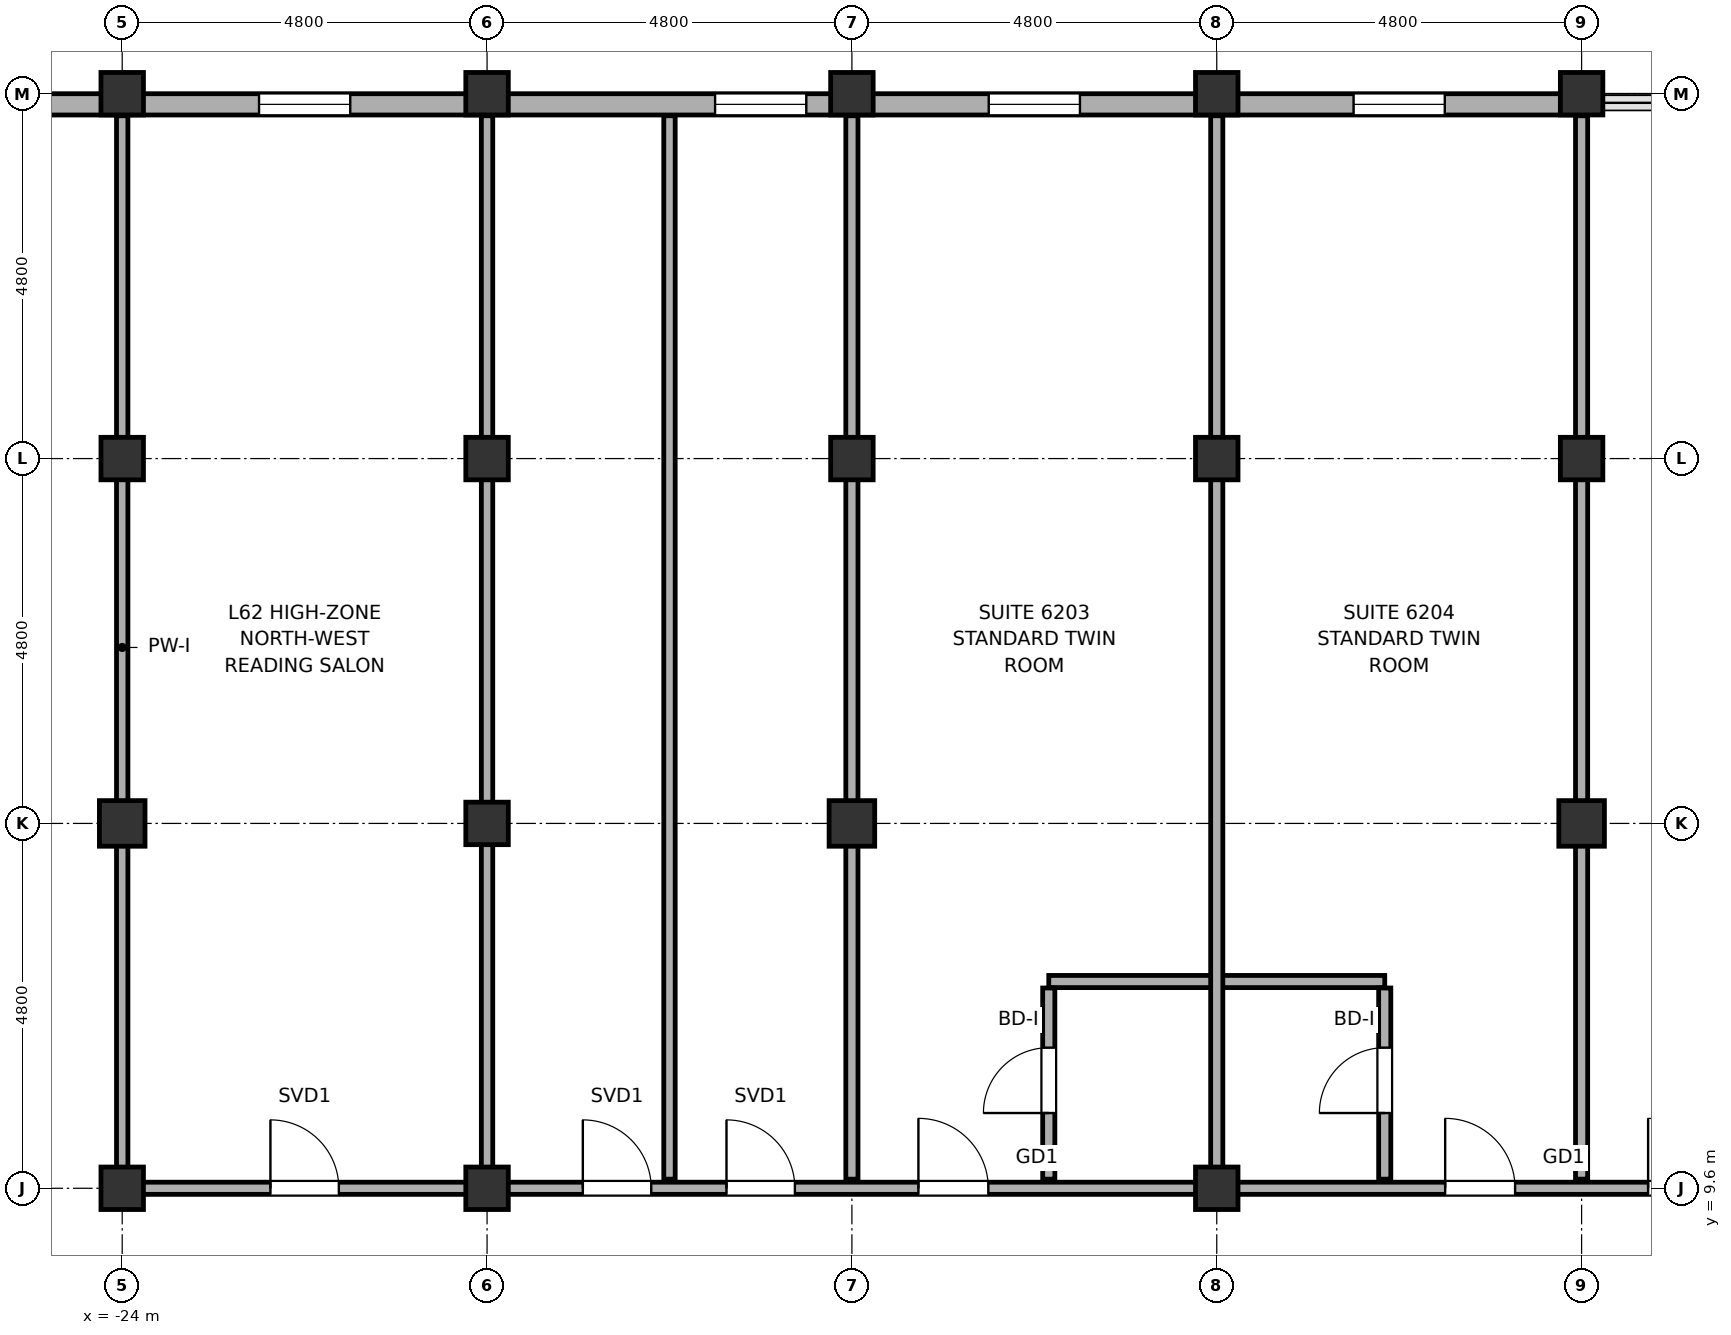
"""IFC4 building model, lengths in metres.
Left out: names, types, materials, properties, quantities, classifications, styles, units other than length and angle.
Written with IfcOpenShell. Run it as: python <this file> out.ifc"""

import sys

from ifc_helpers import new_model, si_unit, direction, frame, frame_2d, origin, origin_2d, place, context, subcontext, project, spatial, rectangle, hollow_rectangle, hollow_circle, extrude, element, fill, save


model = new_model("IFC4")
c1 = context("Model", 3, precision=1e-05, world=origin(), true_north=direction((0.0, 1.0)))
c2 = subcontext(c1, "Body", "Model", "MODEL_VIEW")
j1 = project(units=[si_unit("LENGTHUNIT", "METRE"), si_unit("PLANEANGLEUNIT", "RADIAN")], contexts=[c1])
p1 = place(None, origin())
s1 = spatial("IfcSite", under=j1, at=p1, CompositionType="ELEMENT")
p2 = place(p1, origin())
s2 = spatial("IfcBuilding", under=s1, at=p2, CompositionType="ELEMENT")
p3 = place(p2, frame((0.0, 0.0, 249.25)))
s3 = spatial("IfcBuildingStorey", under=s2, at=p3, CompositionType="ELEMENT", Elevation=249.25)
p4 = place(p3, frame((-24.0, 9.6, 0.0), z_axis=(0.0, 0.0, 1.0), x_axis=(1.0, 0.0, 0.0)))
e1 = element("IfcColumn", 1, at=p4, inside=s3, PredefinedType="COLUMN", context=c2, shape_type="SweptSolid", body=[
    extrude(hollow_circle(Radius=0.28, WallThickness=0.025, at=origin_2d()), origin(), (0.0, 0.0, 1.0), 3.85),
])
p5 = place(p3, frame((-24.0, 14.4, 0.0), z_axis=(0.0, 0.0, 1.0), x_axis=(1.0, 0.0, 0.0)))
e2 = element("IfcColumn", 2, at=p5, inside=s3, PredefinedType="COLUMN", context=c2, shape_type="SweptSolid", body=[
    extrude(hollow_rectangle(XDim=0.6, YDim=0.6, WallThickness=0.028, at=origin_2d()), origin(), (0.0, 0.0, 1.0), 3.85),
])
for number, where, z_axis, x_axis in (
    (3, (-24.0, 19.2, 0.0), (0.0, 0.0, 1.0), (1.0, 0.0, 0.0)),
    (4, (-24.0, 24.0, 0.0), (0.0, 0.0, 1.0), (1.0, 0.0, 0.0)),
    (5, (-19.2, 9.6, 0.0), (0.0, 0.0, 1.0), (1.0, 0.0, 0.0)),
    (6, (-19.2, 14.4, 0.0), (0.0, 0.0, 1.0), (1.0, 0.0, 0.0)),
    (7, (-19.2, 19.2, 0.0), (0.0, 0.0, 1.0), (1.0, 0.0, 0.0)),
    (8, (-19.2, 24.0, 0.0), (0.0, 0.0, 1.0), (1.0, 0.0, 0.0)),
):
    element("IfcColumn", number, at=place(p3, frame(where, z_axis=z_axis, x_axis=x_axis)), inside=s3, PredefinedType="COLUMN", context=c2, shape_type="SweptSolid", body=[
        extrude(hollow_circle(Radius=0.28, WallThickness=0.025, at=origin_2d()), origin(), (0.0, 0.0, 1.0), 3.85),
    ])
p6 = place(p3, frame((-14.4, 14.4, 0.0), z_axis=(0.0, 0.0, 1.0), x_axis=(1.0, 0.0, 0.0)))
e9 = element("IfcColumn", 9, at=p6, inside=s3, PredefinedType="COLUMN", context=c2, shape_type="SweptSolid", body=[
    extrude(hollow_rectangle(XDim=0.6, YDim=0.6, WallThickness=0.028, at=origin_2d()), origin(), (0.0, 0.0, 1.0), 3.85),
])
for number, where, z_axis, x_axis in (
    (10, (-14.4, 19.2, 0.0), (0.0, 0.0, 1.0), (1.0, 0.0, 0.0)),
    (11, (-14.4, 24.0, 0.0), (0.0, 0.0, 1.0), (1.0, 0.0, 0.0)),
    (12, (-9.6, 9.6, 0.0), (0.0, 0.0, 1.0), (1.0, 0.0, 0.0)),
    (13, (-9.6, 19.2, 0.0), (0.0, 0.0, 1.0), (1.0, 0.0, 0.0)),
    (14, (-9.6, 24.0, 0.0), (0.0, 0.0, 1.0), (1.0, 0.0, 0.0)),
):
    element("IfcColumn", number, at=place(p3, frame(where, z_axis=z_axis, x_axis=x_axis)), inside=s3, PredefinedType="COLUMN", context=c2, shape_type="SweptSolid", body=[
        extrude(hollow_circle(Radius=0.28, WallThickness=0.025, at=origin_2d()), origin(), (0.0, 0.0, 1.0), 3.85),
    ])
p7 = place(p3, frame((-4.8, 14.4, 0.0), z_axis=(0.0, 0.0, 1.0), x_axis=(1.0, 0.0, 0.0)))
e15 = element("IfcColumn", 15, at=p7, inside=s3, PredefinedType="COLUMN", context=c2, shape_type="SweptSolid", body=[
    extrude(hollow_rectangle(XDim=0.6, YDim=0.6, WallThickness=0.028, at=origin_2d()), origin(), (0.0, 0.0, 1.0), 3.85),
])
for number, where, z_axis, x_axis in (
    (16, (-4.8, 19.2, 0.0), (0.0, 0.0, 1.0), (1.0, 0.0, 0.0)),
    (17, (-4.8, 24.0, 0.0), (0.0, 0.0, 1.0), (1.0, 0.0, 0.0)),
):
    element("IfcColumn", number, at=place(p3, frame(where, z_axis=z_axis, x_axis=x_axis)), inside=s3, PredefinedType="COLUMN", context=c2, shape_type="SweptSolid", body=[
        extrude(hollow_circle(Radius=0.28, WallThickness=0.025, at=origin_2d()), origin(), (0.0, 0.0, 1.0), 3.85),
    ])
p8 = place(p3, frame((-30.0, 23.86, 0.0), z_axis=(0.0, 0.0, 1.0), x_axis=(1.0, 0.0, 0.0)))
e18 = element("IfcWall", 18, at=p8, inside=s3, PredefinedType="SOLIDWALL", context=c2, shape_type="SweptSolid", body=[
    extrude(rectangle(XDim=25.25, YDim=0.28, at=frame_2d((12.625, 0.0))), origin(), (0.0, 0.0, 1.0), 2.27),
])
p9 = place(p8, frame((7.8, 0.0, 0.75)))
e19 = element("IfcOpeningElement", 19, at=p9, cuts=e18, PredefinedType="OPENING", context=c2, shape_type="SweptSolid", body=[
    extrude(rectangle(XDim=1.2, YDim=1.15, at=frame_2d((0.6, 0.575))), frame((0.0, 0.155, 0.0), z_axis=(0.0, -1.0, 0.0), x_axis=(1.0, 0.0, 0.0)), (0.0, 0.0, 1.0), 0.31),
])
p10 = place(p8, frame((13.8, 0.0, 0.75)))
e20 = element("IfcOpeningElement", 20, at=p10, cuts=e18, PredefinedType="OPENING", context=c2, shape_type="SweptSolid", body=[
    extrude(rectangle(XDim=1.2, YDim=1.15, at=frame_2d((0.6, 0.575))), frame((0.0, 0.155, 0.0), z_axis=(0.0, -1.0, 0.0), x_axis=(1.0, 0.0, 0.0)), (0.0, 0.0, 1.0), 0.31),
])
p11 = place(p8, frame((17.4, 0.0, 0.75)))
e21 = element("IfcOpeningElement", 21, at=p11, cuts=e18, PredefinedType="OPENING", context=c2, shape_type="SweptSolid", body=[
    extrude(rectangle(XDim=1.2, YDim=1.15, at=frame_2d((0.6, 0.575))), frame((0.0, 0.155, 0.0), z_axis=(0.0, -1.0, 0.0), x_axis=(1.0, 0.0, 0.0)), (0.0, 0.0, 1.0), 0.31),
])
p12 = place(p8, frame((22.2, 0.0, 0.75)))
e22 = element("IfcOpeningElement", 22, at=p12, cuts=e18, PredefinedType="OPENING", context=c2, shape_type="SweptSolid", body=[
    extrude(rectangle(XDim=1.2, YDim=1.15, at=frame_2d((0.6, 0.575))), frame((0.0, 0.155, 0.0), z_axis=(0.0, -1.0, 0.0), x_axis=(1.0, 0.0, 0.0)), (0.0, 0.0, 1.0), 0.31),
])
p13 = place(p3, frame((-23.92, 9.6, 0.0), z_axis=(0.0, 0.0, 1.0), x_axis=(1.0, 0.0, 0.0)))
e23 = element("IfcWall", 23, at=p13, inside=s3, PredefinedType="PARTITIONING", context=c2, shape_type="SweptSolid", body=[
    extrude(rectangle(XDim=47.84, YDim=0.16, at=frame_2d((23.92, 0.0))), origin(), (0.0, 0.0, 1.0), 2.27),
])
p14 = place(p13, frame((1.87, 0.0, 0.0)))
e24 = element("IfcOpeningElement", 24, at=p14, cuts=e23, PredefinedType="OPENING", context=c2, shape_type="SweptSolid", body=[
    extrude(rectangle(XDim=0.9, YDim=2.1, at=frame_2d((0.45, 1.05))), frame((0.0, 0.095, 0.0), z_axis=(0.0, -1.0, 0.0), x_axis=(1.0, 0.0, 0.0)), (0.0, 0.0, 1.0), 0.19),
])
p15 = place(p13, frame((45.07, 0.0, 0.0)))
e25 = element("IfcOpeningElement", 25, at=p15, cuts=e23, PredefinedType="OPENING", context=c2, shape_type="SweptSolid", body=[
    extrude(rectangle(XDim=0.9, YDim=2.1, at=frame_2d((0.45, 1.05))), frame((0.0, 0.095, 0.0), z_axis=(0.0, -1.0, 0.0), x_axis=(1.0, 0.0, 0.0)), (0.0, 0.0, 1.0), 0.19),
])
p16 = place(p13, frame((5.98, 0.0, 0.0)))
e26 = element("IfcOpeningElement", 26, at=p16, cuts=e23, PredefinedType="OPENING", context=c2, shape_type="SweptSolid", body=[
    extrude(rectangle(XDim=0.9, YDim=2.1, at=frame_2d((0.45, 1.05))), frame((0.0, 0.095, 0.0), z_axis=(0.0, -1.0, 0.0), x_axis=(1.0, 0.0, 0.0)), (0.0, 0.0, 1.0), 0.19),
])
p17 = place(p13, frame((7.87, 0.0, 0.0)))
e27 = element("IfcOpeningElement", 27, at=p17, cuts=e23, PredefinedType="OPENING", context=c2, shape_type="SweptSolid", body=[
    extrude(rectangle(XDim=0.9, YDim=2.1, at=frame_2d((0.45, 1.05))), frame((0.0, 0.095, 0.0), z_axis=(0.0, -1.0, 0.0), x_axis=(1.0, 0.0, 0.0)), (0.0, 0.0, 1.0), 0.19),
])
p18 = place(p13, frame((10.395, 0.0, 0.0)))
e28 = element("IfcOpeningElement", 28, at=p18, cuts=e23, PredefinedType="OPENING", context=c2, shape_type="SweptSolid", body=[
    extrude(rectangle(XDim=0.92, YDim=2.15, at=frame_2d((0.46, 1.075))), frame((0.0, 0.095, 0.0), z_axis=(0.0, -1.0, 0.0), x_axis=(1.0, 0.0, 0.0)), (0.0, 0.0, 1.0), 0.19),
])
p19 = place(p13, frame((17.325, 0.0, 0.0)))
e29 = element("IfcOpeningElement", 29, at=p19, cuts=e23, PredefinedType="OPENING", context=c2, shape_type="SweptSolid", body=[
    extrude(rectangle(XDim=0.92, YDim=2.15, at=frame_2d((0.46, 1.075))), frame((0.0, 0.095, 0.0), z_axis=(0.0, -1.0, 0.0), x_axis=(1.0, 0.0, 0.0)), (0.0, 0.0, 1.0), 0.19),
])
p20 = place(p13, frame((19.995, 0.0, 0.0)))
e30 = element("IfcOpeningElement", 30, at=p20, cuts=e23, PredefinedType="OPENING", context=c2, shape_type="SweptSolid", body=[
    extrude(rectangle(XDim=0.92, YDim=2.15, at=frame_2d((0.46, 1.075))), frame((0.0, 0.095, 0.0), z_axis=(0.0, -1.0, 0.0), x_axis=(1.0, 0.0, 0.0)), (0.0, 0.0, 1.0), 0.19),
])
p21 = place(p13, frame((25.87, 0.0, 0.0)))
e31 = element("IfcOpeningElement", 31, at=p21, cuts=e23, PredefinedType="OPENING", context=c2, shape_type="SweptSolid", body=[
    extrude(rectangle(XDim=0.9, YDim=2.1, at=frame_2d((0.45, 1.05))), frame((0.0, 0.095, 0.0), z_axis=(0.0, -1.0, 0.0), x_axis=(1.0, 0.0, 0.0)), (0.0, 0.0, 1.0), 0.19),
])
p22 = place(p13, frame((40.83, 0.0, 0.0)))
e32 = element("IfcOpeningElement", 32, at=p22, cuts=e23, PredefinedType="OPENING", context=c2, shape_type="SweptSolid", body=[
    extrude(rectangle(XDim=0.92, YDim=2.15, at=frame_2d((0.46, 1.075))), frame((0.0, 0.095, 0.0), z_axis=(0.0, -1.0, 0.0), x_axis=(1.0, 0.0, 0.0)), (0.0, 0.0, 1.0), 0.19),
])
p23 = place(p3, frame((-11.81, 12.32, 0.0), z_axis=(0.0, 0.0, 1.0), x_axis=(1.0, 0.0, 0.0)))
e33 = element("IfcWall", 33, at=p23, inside=s3, PredefinedType="PARTITIONING", context=c2, shape_type="SweptSolid", body=[
    extrude(rectangle(XDim=4.42, YDim=0.16, at=frame_2d((2.21, 0.0))), origin(), (0.0, 0.0, 1.0), 3.31),
])
for number, where, z_axis, x_axis in (
    (34, (-24.0, 9.72, 0.0), (0.0, 0.0, 1.0), (0.0, 1.0, 0.0)),
    (35, (-19.2, 9.72, 0.0), (0.0, 0.0, 1.0), (0.0, 1.0, 0.0)),
    (36, (-16.8, 9.72, 0.0), (0.0, 0.0, 1.0), (0.0, 1.0, 0.0)),
):
    element("IfcWall", number, at=place(p3, frame(where, z_axis=z_axis, x_axis=x_axis)), inside=s3, PredefinedType="PARTITIONING", context=c2, shape_type="SweptSolid", body=[
        extrude(rectangle(XDim=13.99, YDim=0.15, at=frame_2d((6.995, 0.0))), origin(), (0.0, 0.0, 1.0), 2.27),
    ])
p24 = place(p3, frame((-14.4, 9.72, 0.0), z_axis=(0.0, 0.0, 1.0), x_axis=(0.0, 1.0, 0.0)))
e37 = element("IfcWall", 37, at=p24, inside=s3, PredefinedType="PARTITIONING", context=c2, shape_type="SweptSolid", body=[
    extrude(rectangle(XDim=13.99, YDim=0.16, at=frame_2d((6.995, 0.0))), origin(), (0.0, 0.0, 1.0), 2.27),
])
p25 = place(p3, frame((-11.81, 9.72, 0.0), z_axis=(0.0, 0.0, 1.0), x_axis=(0.0, 1.0, 0.0)))
e38 = element("IfcWall", 38, at=p25, inside=s3, PredefinedType="PARTITIONING", context=c2, shape_type="SweptSolid", body=[
    extrude(rectangle(XDim=2.515, YDim=0.16, at=frame_2d((1.258, 0.0))), origin(), (0.0, 0.0, 1.0), 2.27),
])
p26 = place(p25, frame((0.87, 0.0, 0.0)))
e39 = element("IfcOpeningElement", 39, at=p26, cuts=e38, PredefinedType="OPENING", context=c2, shape_type="SweptSolid", body=[
    extrude(rectangle(XDim=0.86, YDim=2.1, at=frame_2d((0.43, 1.05))), frame((0.0, 0.095, 0.0), z_axis=(0.0, -1.0, 0.0), x_axis=(1.0, 0.0, 0.0)), (0.0, 0.0, 1.0), 0.19),
])
p27 = place(p3, frame((-9.6, 9.72, 0.0), z_axis=(0.0, 0.0, 1.0), x_axis=(0.0, 1.0, 0.0)))
e40 = element("IfcWall", 40, at=p27, inside=s3, PredefinedType="PARTITIONING", context=c2, shape_type="SweptSolid", body=[
    extrude(rectangle(XDim=13.99, YDim=0.16, at=frame_2d((6.995, 0.0))), origin(), (0.0, 0.0, 1.0), 2.27),
])
p28 = place(p3, frame((-7.39, 9.72, 0.0), z_axis=(0.0, 0.0, 1.0), x_axis=(0.0, 1.0, 0.0)))
e41 = element("IfcWall", 41, at=p28, inside=s3, PredefinedType="PARTITIONING", context=c2, shape_type="SweptSolid", body=[
    extrude(rectangle(XDim=2.515, YDim=0.16, at=frame_2d((1.258, 0.0))), origin(), (0.0, 0.0, 1.0), 2.27),
])
p29 = place(p28, frame((0.87, 0.0, 0.0)))
e42 = element("IfcOpeningElement", 42, at=p29, cuts=e41, PredefinedType="OPENING", context=c2, shape_type="SweptSolid", body=[
    extrude(rectangle(XDim=0.86, YDim=2.1, at=frame_2d((0.43, 1.05))), frame((0.0, 0.095, 0.0), z_axis=(0.0, -1.0, 0.0), x_axis=(1.0, 0.0, 0.0)), (0.0, 0.0, 1.0), 0.19),
])
p30 = place(p3, frame((-4.8, 9.72, 0.0), z_axis=(0.0, 0.0, 1.0), x_axis=(0.0, 1.0, 0.0)))
e43 = element("IfcWall", 43, at=p30, inside=s3, PredefinedType="PARTITIONING", context=c2, shape_type="SweptSolid", body=[
    extrude(rectangle(XDim=13.99, YDim=0.16, at=frame_2d((6.995, 0.0))), origin(), (0.0, 0.0, 1.0), 2.27),
])
p31 = place(p9, origin())
e44 = element("IfcWindow", 44, at=p31, inside=s3, PartitioningType="SINGLE_PANEL", PredefinedType="WINDOW", context=c2, shape_type="SweptSolid", body=[
    extrude(rectangle(XDim=1.2, YDim=1.15, at=frame_2d((0.6, 0.575))), frame((0.0, 0.03, 0.0), z_axis=(0.0, -1.0, 0.0), x_axis=(1.0, 0.0, 0.0)), (0.0, 0.0, 1.0), 0.06),
])
fill(e19, e44)
p32 = place(p10, origin())
e45 = element("IfcWindow", 45, at=p32, inside=s3, PartitioningType="SINGLE_PANEL", PredefinedType="WINDOW", context=c2, shape_type="SweptSolid", body=[
    extrude(rectangle(XDim=1.2, YDim=1.15, at=frame_2d((0.6, 0.575))), frame((0.0, 0.03, 0.0), z_axis=(0.0, -1.0, 0.0), x_axis=(1.0, 0.0, 0.0)), (0.0, 0.0, 1.0), 0.06),
])
fill(e20, e45)
p33 = place(p11, origin())
e46 = element("IfcWindow", 46, at=p33, inside=s3, PartitioningType="SINGLE_PANEL", PredefinedType="WINDOW", context=c2, shape_type="SweptSolid", body=[
    extrude(rectangle(XDim=1.2, YDim=1.15, at=frame_2d((0.6, 0.575))), frame((0.0, 0.03, 0.0), z_axis=(0.0, -1.0, 0.0), x_axis=(1.0, 0.0, 0.0)), (0.0, 0.0, 1.0), 0.06),
])
fill(e21, e46)
p34 = place(p12, origin())
e47 = element("IfcWindow", 47, at=p34, inside=s3, PartitioningType="SINGLE_PANEL", PredefinedType="WINDOW", context=c2, shape_type="SweptSolid", body=[
    extrude(rectangle(XDim=1.2, YDim=1.15, at=frame_2d((0.6, 0.575))), frame((0.0, 0.03, 0.0), z_axis=(0.0, -1.0, 0.0), x_axis=(1.0, 0.0, 0.0)), (0.0, 0.0, 1.0), 0.06),
])
fill(e22, e47)
p35 = place(p14, origin())
e48 = element("IfcDoor", 48, at=p35, inside=s3, OperationType="SINGLE_SWING_RIGHT", PredefinedType="DOOR", context=c2, shape_type="SweptSolid", body=[
    extrude(rectangle(XDim=0.9, YDim=2.1, at=frame_2d((0.45, 1.05))), frame((0.0, 0.025, 0.0), z_axis=(0.0, -1.0, 0.0), x_axis=(1.0, 0.0, 0.0)), (0.0, 0.0, 1.0), 0.05),
])
fill(e24, e48)
p36 = place(p16, origin())
e49 = element("IfcDoor", 49, at=p36, inside=s3, OperationType="SINGLE_SWING_RIGHT", PredefinedType="DOOR", context=c2, shape_type="SweptSolid", body=[
    extrude(rectangle(XDim=0.9, YDim=2.1, at=frame_2d((0.45, 1.05))), frame((0.0, 0.025, 0.0), z_axis=(0.0, -1.0, 0.0), x_axis=(1.0, 0.0, 0.0)), (0.0, 0.0, 1.0), 0.05),
])
fill(e26, e49)
p37 = place(p17, origin())
e50 = element("IfcDoor", 50, at=p37, inside=s3, OperationType="SINGLE_SWING_LEFT", PredefinedType="DOOR", context=c2, shape_type="SweptSolid", body=[
    extrude(rectangle(XDim=0.9, YDim=2.1, at=frame_2d((0.45, 1.05))), frame((0.0, 0.025, 0.0), z_axis=(0.0, -1.0, 0.0), x_axis=(1.0, 0.0, 0.0)), (0.0, 0.0, 1.0), 0.05),
])
fill(e27, e50)
p38 = place(p18, origin())
e51 = element("IfcDoor", 51, at=p38, inside=s3, OperationType="SINGLE_SWING_RIGHT", PredefinedType="DOOR", context=c2, shape_type="SweptSolid", body=[
    extrude(rectangle(XDim=0.92, YDim=2.15, at=frame_2d((0.46, 1.075))), frame((0.0, 0.025, 0.0), z_axis=(0.0, -1.0, 0.0), x_axis=(1.0, 0.0, 0.0)), (0.0, 0.0, 1.0), 0.05),
])
fill(e28, e51)
p39 = place(p26, origin())
e52 = element("IfcDoor", 52, at=p39, inside=s3, OperationType="SINGLE_SWING_RIGHT", PredefinedType="DOOR", context=c2, shape_type="SweptSolid", body=[
    extrude(rectangle(XDim=0.86, YDim=2.1, at=frame_2d((0.43, 1.05))), frame((0.0, 0.025, 0.0), z_axis=(0.0, -1.0, 0.0), x_axis=(1.0, 0.0, 0.0)), (0.0, 0.0, 1.0), 0.05),
])
fill(e39, e52)
p40 = place(p19, origin())
e53 = element("IfcDoor", 53, at=p40, inside=s3, OperationType="SINGLE_SWING_RIGHT", PredefinedType="DOOR", context=c2, shape_type="SweptSolid", body=[
    extrude(rectangle(XDim=0.92, YDim=2.15, at=frame_2d((0.46, 1.075))), frame((0.0, 0.025, 0.0), z_axis=(0.0, -1.0, 0.0), x_axis=(1.0, 0.0, 0.0)), (0.0, 0.0, 1.0), 0.05),
])
fill(e29, e53)
p41 = place(p29, origin())
e54 = element("IfcDoor", 54, at=p41, inside=s3, OperationType="SINGLE_SWING_LEFT", PredefinedType="DOOR", context=c2, shape_type="SweptSolid", body=[
    extrude(rectangle(XDim=0.86, YDim=2.1, at=frame_2d((0.43, 1.05))), frame((0.0, 0.025, 0.0), z_axis=(0.0, -1.0, 0.0), x_axis=(1.0, 0.0, 0.0)), (0.0, 0.0, 1.0), 0.05),
])
fill(e42, e54)
p42 = place(p20, origin())
e55 = element("IfcDoor", 55, at=p42, inside=s3, OperationType="SINGLE_SWING_RIGHT", PredefinedType="DOOR", context=c2, shape_type="SweptSolid", body=[
    extrude(rectangle(XDim=0.92, YDim=2.15, at=frame_2d((0.46, 1.075))), frame((0.0, 0.025, 0.0), z_axis=(0.0, -1.0, 0.0), x_axis=(1.0, 0.0, 0.0)), (0.0, 0.0, 1.0), 0.05),
])
fill(e30, e55)
save(model, sys.argv[1])
